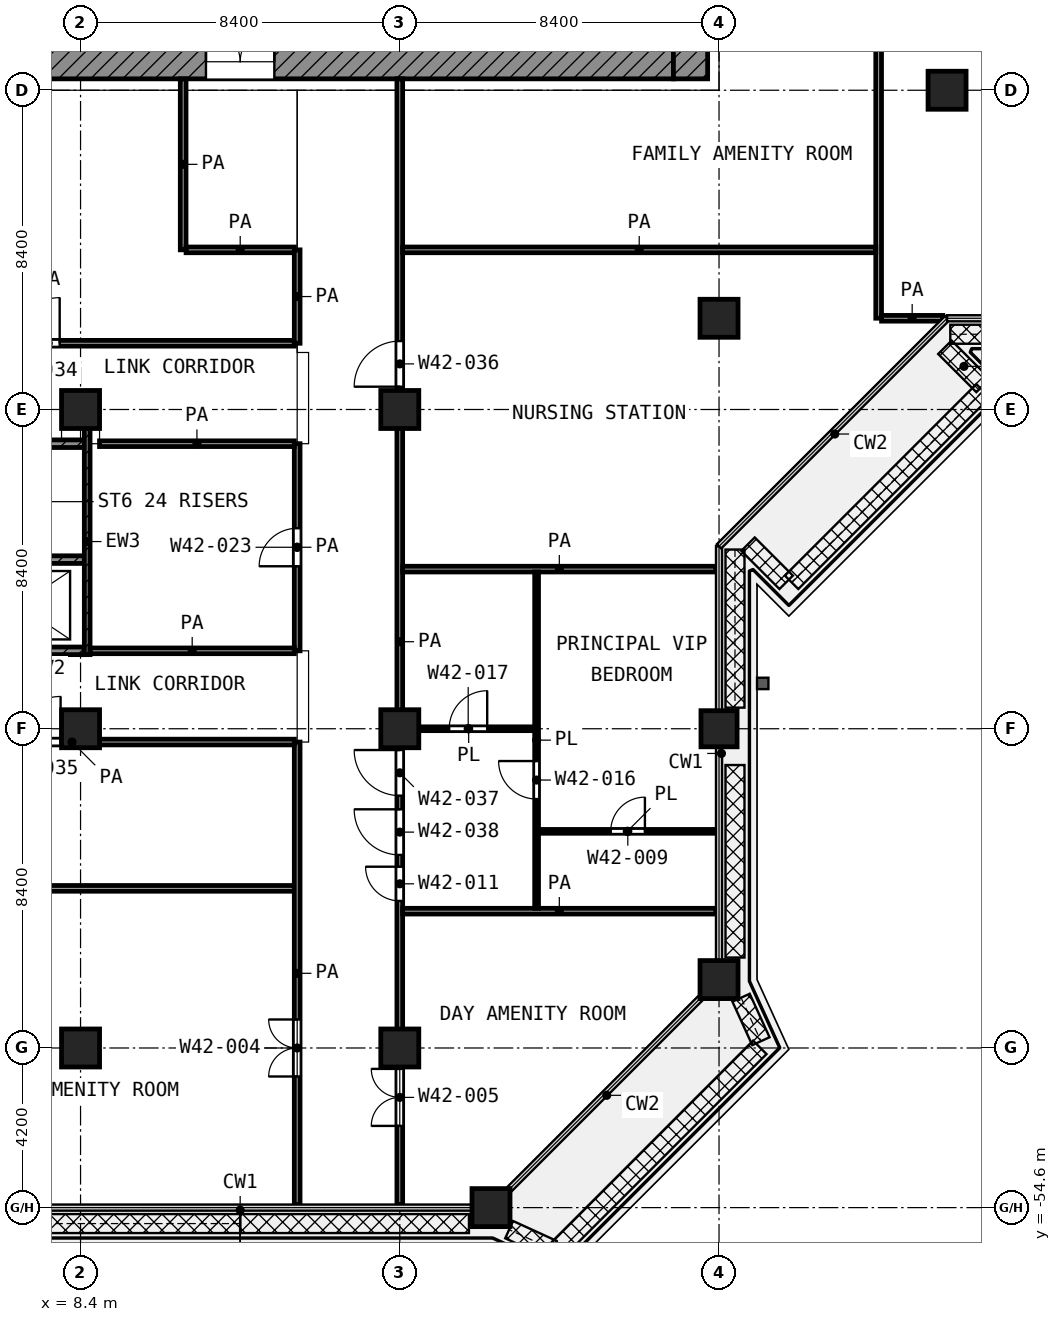
"""IFC4 building model, lengths in metres.
Left out: names, types, materials, properties, quantities, classifications, styles, units other than length and angle.
Written with IfcOpenShell. Run it as: python <this file> out.ifc"""

import sys

from ifc_helpers import new_model, si_unit, direction, frame, frame_2d, origin, origin_2d, place, context, subcontext, project, spatial, rectangle, extrude, element, fill, save


model = new_model("IFC4")
c1 = context("Model", 3, precision=1e-05, world=origin(), true_north=direction((0.0, 1.0)))
c2 = subcontext(c1, "Body", "Model", "MODEL_VIEW")
j1 = project(units=[si_unit("LENGTHUNIT", "METRE"), si_unit("PLANEANGLEUNIT", "RADIAN")], contexts=[c1])
p1 = place(None, origin())
s1 = spatial("IfcSite", under=j1, at=p1, CompositionType="ELEMENT")
p2 = place(p1, origin())
s2 = spatial("IfcBuilding", under=s1, at=p2, CompositionType="ELEMENT")
p3 = place(p2, frame((0.0, 0.0, 183.6)))
s3 = spatial("IfcBuildingStorey", under=s2, at=p3, CompositionType="ELEMENT", Elevation=183.6)
for number, where, z_axis, x_axis in (
    (1, (31.2, -25.2, 0.0), (0.0, 0.0, 1.0), (1.0, 0.0, 0.0)),
    (2, (25.2, -31.2, 0.0), (0.0, 0.0, 1.0), (1.0, 0.0, 0.0)),
    (3, (8.4, -33.6, 0.0), (0.0, 0.0, 1.0), (1.0, 0.0, 0.0)),
    (4, (16.8, -33.6, 0.0), (0.0, 0.0, 1.0), (1.0, 0.0, 0.0)),
    (5, (8.4, -42.0, 0.0), (0.0, 0.0, 1.0), (1.0, 0.0, 0.0)),
    (6, (16.8, -42.0, 0.0), (0.0, 0.0, 1.0), (1.0, 0.0, 0.0)),
):
    element("IfcColumn", number, at=place(p3, frame(where, z_axis=z_axis, x_axis=x_axis)), inside=s3, PredefinedType="COLUMN", context=c2, shape_type="SweptSolid", body=[
        extrude(rectangle(XDim=1.0, YDim=1.0, at=origin_2d()), origin(), (0.0, 0.0, 1.0), 4.2),
    ])
p4 = place(p3, frame((25.2, -42.0, 0.0), z_axis=(0.0, 0.0, 1.0), x_axis=(1.0, 0.0, 0.0)))
e7 = element("IfcColumn", 7, at=p4, inside=s3, PredefinedType="COLUMN", context=c2, shape_type="SweptSolid", body=[
    extrude(rectangle(XDim=0.95, YDim=0.95, at=origin_2d()), origin(), (0.0, 0.0, 1.0), 4.2),
])
for number, where, z_axis, x_axis in (
    (8, (25.2, -48.6, 0.0), (0.0, 0.0, 1.0), (1.0, 0.0, 0.0)),
    (9, (8.4, -50.4, 0.0), (0.0, 0.0, 1.0), (1.0, 0.0, 0.0)),
    (10, (16.8, -50.4, 0.0), (0.0, 0.0, 1.0), (1.0, 0.0, 0.0)),
    (11, (19.2, -54.6, 0.0), (0.0, 0.0, 1.0), (1.0, 0.0, 0.0)),
):
    element("IfcColumn", number, at=place(p3, frame(where, z_axis=z_axis, x_axis=x_axis)), inside=s3, PredefinedType="COLUMN", context=c2, shape_type="SweptSolid", body=[
        extrude(rectangle(XDim=1.0, YDim=1.0, at=origin_2d()), origin(), (0.0, 0.0, 1.0), 4.2),
    ])
p5 = place(p3, frame((5.4, -24.45, 0.0), z_axis=(0.0, 0.0, 1.0), x_axis=(1.0, 0.0, 0.0)))
e12 = element("IfcWall", 12, at=p5, inside=s3, PredefinedType="SHEAR", context=c2, shape_type="SweptSolid", body=[
    extrude(rectangle(XDim=18.6, YDim=0.9, at=frame_2d((9.3, 0.0))), origin(), (0.0, 0.0, 1.0), 3.6),
])
p6 = place(p5, frame((6.3, 0.0, 0.0)))
e13 = element("IfcOpeningElement", 13, at=p6, cuts=e12, PredefinedType="OPENING", context=c2, shape_type="SweptSolid", body=[
    extrude(rectangle(XDim=1.8, YDim=2.1, at=frame_2d((0.9, 1.05))), frame((0.0, 0.46, 0.0), z_axis=(0.0, -1.0, 0.0), x_axis=(1.0, 0.0, 0.0)), (0.0, 0.0, 1.0), 0.92),
])
p7 = place(p3, frame((24.45, -24.9, 0.0), z_axis=(0.0, 0.0, 1.0), x_axis=(0.0, 1.0, 0.0)))
e14 = element("IfcWall", 14, at=p7, inside=s3, PredefinedType="SHEAR", context=c2, shape_type="SweptSolid", body=[
    extrude(rectangle(XDim=0.9, YDim=0.9, at=frame_2d((0.45, 0.0))), origin(), (0.0, 0.0, 1.0), 3.6),
])
p8 = place(p3, frame((8.575, -40.05, 0.0), z_axis=(0.0, 0.0, 1.0), x_axis=(0.0, 1.0, 0.0)))
e15 = element("IfcWall", 15, at=p8, inside=s3, PredefinedType="SHEAR", context=c2, shape_type="SweptSolid", body=[
    extrude(rectangle(XDim=5.95, YDim=0.15, at=frame_2d((2.975, 0.0))), origin(), (0.0, 0.0, 1.0), 3.6),
])
p9 = place(p3, frame((0.45, -34.5, 0.0), z_axis=(0.0, 0.0, 1.0), x_axis=(1.0, 0.0, 0.0)))
e16 = element("IfcWall", 16, at=p9, inside=s3, PredefinedType="SHEAR", context=c2, shape_type="SweptSolid", body=[
    extrude(rectangle(XDim=8.05, YDim=0.2, at=frame_2d((4.025, 0.0))), origin(), (0.0, 0.0, 1.0), 3.6),
])
p10 = place(p9, frame((0.75, 0.0, 0.0)))
e17 = element("IfcOpeningElement", 17, at=p10, cuts=e16, PredefinedType="OPENING", context=c2, shape_type="SweptSolid", body=[
    extrude(rectangle(XDim=1.1, YDim=2.1, at=frame_2d((0.55, 1.05))), frame((0.0, 0.11, 0.0), z_axis=(0.0, -1.0, 0.0), x_axis=(1.0, 0.0, 0.0)), (0.0, 0.0, 1.0), 0.22),
])
p11 = place(p3, frame((0.45, -37.55, 0.0), z_axis=(0.0, 0.0, 1.0), x_axis=(1.0, 0.0, 0.0)))
e18 = element("IfcWall", 18, at=p11, inside=s3, PredefinedType="SHEAR", context=c2, shape_type="SweptSolid", body=[
    extrude(rectangle(XDim=8.05, YDim=0.2, at=frame_2d((4.025, 0.0))), origin(), (0.0, 0.0, 1.0), 3.6),
])
p12 = place(p11, frame((0.1, 0.0, 0.0)))
e19 = element("IfcOpeningElement", 19, at=p12, cuts=e18, PredefinedType="OPENING", context=c2, shape_type="SweptSolid", body=[
    extrude(rectangle(XDim=1.1, YDim=2.1, at=frame_2d((0.55, 1.05))), frame((0.0, 0.11, 0.0), z_axis=(0.0, -1.0, 0.0), x_axis=(1.0, 0.0, 0.0)), (0.0, 0.0, 1.0), 0.22),
])
p13 = place(p3, frame((0.45, -39.95, 0.0), z_axis=(0.0, 0.0, 1.0), x_axis=(1.0, 0.0, 0.0)))
e20 = element("IfcWall", 20, at=p13, inside=s3, PredefinedType="SHEAR", context=c2, shape_type="SweptSolid", body=[
    extrude(rectangle(XDim=8.05, YDim=0.2, at=frame_2d((4.025, 0.0))), origin(), (0.0, 0.0, 1.0), 3.6),
])
p14 = place(p13, frame((2.0, 0.0, 0.0)))
e21 = element("IfcOpeningElement", 21, at=p14, cuts=e20, PredefinedType="OPENING", context=c2, shape_type="SweptSolid", body=[
    extrude(rectangle(XDim=1.1, YDim=2.1, at=frame_2d((0.55, 1.05))), frame((0.0, 0.11, 0.0), z_axis=(0.0, -1.0, 0.0), x_axis=(1.0, 0.0, 0.0)), (0.0, 0.0, 1.0), 0.22),
])
p15 = place(p3, frame((20.45, -44.7, 0.0), z_axis=(0.0, 0.0, 1.0), x_axis=(1.0, 0.0, 0.0)))
e22 = element("IfcWall", 22, at=p15, inside=s3, PredefinedType="PARTITIONING", context=c2, shape_type="SweptSolid", body=[
    extrude(rectangle(XDim=4.67, YDim=0.1, at=frame_2d((2.335, 0.0))), origin(), (0.0, 0.0, 1.0), 3.6),
])
p16 = place(p15, frame((1.9, 0.0, 0.0)))
e23 = element("IfcOpeningElement", 23, at=p16, cuts=e22, PredefinedType="OPENING", context=c2, shape_type="SweptSolid", body=[
    extrude(rectangle(XDim=0.9, YDim=2.1, at=frame_2d((0.45, 1.05))), frame((0.0, 0.06, 0.0), z_axis=(0.0, -1.0, 0.0), x_axis=(1.0, 0.0, 0.0)), (0.0, 0.0, 1.0), 0.12),
])
p17 = place(p3, frame((16.875, -42.0, 0.0), z_axis=(0.0, 0.0, 1.0), x_axis=(1.0, 0.0, 0.0)))
e24 = element("IfcWall", 24, at=p17, inside=s3, PredefinedType="PARTITIONING", context=c2, shape_type="SweptSolid", body=[
    extrude(rectangle(XDim=3.475, YDim=0.1, at=frame_2d((1.738, 0.0))), origin(), (0.0, 0.0, 1.0), 3.6),
])
p18 = place(p17, frame((1.225, 0.0, 0.0)))
e25 = element("IfcOpeningElement", 25, at=p18, cuts=e24, PredefinedType="OPENING", context=c2, shape_type="SweptSolid", body=[
    extrude(rectangle(XDim=1.0, YDim=2.1, at=frame_2d((0.5, 1.05))), frame((0.0, 0.06, 0.0), z_axis=(0.0, -1.0, 0.0), x_axis=(1.0, 0.0, 0.0)), (0.0, 0.0, 1.0), 0.12),
])
p19 = place(p3, frame((20.4, -46.725, 0.0), z_axis=(0.0, 0.0, 1.0), x_axis=(0.0, 1.0, 0.0)))
e26 = element("IfcWall", 26, at=p19, inside=s3, PredefinedType="PARTITIONING", context=c2, shape_type="SweptSolid", body=[
    extrude(rectangle(XDim=8.85, YDim=0.1, at=frame_2d((4.425, 0.0))), origin(), (0.0, 0.0, 1.0), 3.6),
])
p20 = place(p19, frame((2.875, 0.0, 0.0)))
e27 = element("IfcOpeningElement", 27, at=p20, cuts=e26, PredefinedType="OPENING", context=c2, shape_type="SweptSolid", body=[
    extrude(rectangle(XDim=1.0, YDim=2.1, at=frame_2d((0.5, 1.05))), frame((0.0, 0.06, 0.0), z_axis=(0.0, -1.0, 0.0), x_axis=(1.0, 0.0, 0.0)), (0.0, 0.0, 1.0), 0.12),
])
p21 = place(p3, frame((16.875, -46.8, 0.0), z_axis=(0.0, 0.0, 1.0), x_axis=(1.0, 0.0, 0.0)))
e28 = element("IfcWall", 28, at=p21, inside=s3, PredefinedType="PARTITIONING", context=c2, shape_type="SweptSolid", body=[
    extrude(rectangle(XDim=8.245, YDim=0.15, at=frame_2d((4.123, 0.0))), origin(), (0.0, 0.0, 1.0), 3.6),
])
p22 = place(p3, frame((0.08, -46.2, 0.0), z_axis=(0.0, 0.0, 1.0), x_axis=(1.0, 0.0, 0.0)))
e29 = element("IfcWall", 29, at=p22, inside=s3, PredefinedType="PARTITIONING", context=c2, shape_type="SweptSolid", body=[
    extrude(rectangle(XDim=13.945, YDim=0.15, at=frame_2d((6.972, 0.0))), origin(), (0.0, 0.0, 1.0), 3.6),
])
p23 = place(p3, frame((2.326, -42.35, 0.0), z_axis=(0.0, 0.0, 1.0), x_axis=(1.0, 0.0, 0.0)))
e30 = element("IfcWall", 30, at=p23, inside=s3, PredefinedType="PARTITIONING", context=c2, shape_type="SweptSolid", body=[
    extrude(rectangle(XDim=11.699, YDim=0.15, at=frame_2d((5.85, 0.0))), origin(), (0.0, 0.0, 1.0), 3.6),
])
p24 = place(p23, frame((4.349, 0.0, 0.0)))
e31 = element("IfcOpeningElement", 31, at=p24, cuts=e30, PredefinedType="OPENING", context=c2, shape_type="SweptSolid", body=[
    extrude(rectangle(XDim=1.2, YDim=2.1, at=frame_2d((0.6, 1.05))), frame((0.0, 0.085, 0.0), z_axis=(0.0, -1.0, 0.0), x_axis=(1.0, 0.0, 0.0)), (0.0, 0.0, 1.0), 0.17),
])
p25 = place(p3, frame((8.65, -39.95, 0.0), z_axis=(0.0, 0.0, 1.0), x_axis=(1.0, 0.0, 0.0)))
e32 = element("IfcWall", 32, at=p25, inside=s3, PredefinedType="PARTITIONING", context=c2, shape_type="SweptSolid", body=[
    extrude(rectangle(XDim=5.375, YDim=0.15, at=frame_2d((2.688, 0.0))), origin(), (0.0, 0.0, 1.0), 3.6),
])
p26 = place(p3, frame((16.875, -37.8, 0.0), z_axis=(0.0, 0.0, 1.0), x_axis=(1.0, 0.0, 0.0)))
e33 = element("IfcWall", 33, at=p26, inside=s3, PredefinedType="PARTITIONING", context=c2, shape_type="SweptSolid", body=[
    extrude(rectangle(XDim=8.245, YDim=0.15, at=frame_2d((4.123, 0.0))), origin(), (0.0, 0.0, 1.0), 3.6),
])
p27 = place(p3, frame((8.9, -34.5, 0.0), z_axis=(0.0, 0.0, 1.0), x_axis=(1.0, 0.0, 0.0)))
e34 = element("IfcWall", 34, at=p27, inside=s3, PredefinedType="PARTITIONING", context=c2, shape_type="SweptSolid", body=[
    extrude(rectangle(XDim=5.125, YDim=0.15, at=frame_2d((2.562, 0.0))), origin(), (0.0, 0.0, 1.0), 3.6),
])
p28 = place(p3, frame((1.077, -31.857, 0.0), z_axis=(0.0, 0.0, 1.0), x_axis=(1.0, 0.0, 0.0)))
e35 = element("IfcWall", 35, at=p28, inside=s3, PredefinedType="PARTITIONING", context=c2, shape_type="SweptSolid", body=[
    extrude(rectangle(XDim=12.948, YDim=0.15, at=frame_2d((6.474, 0.0))), origin(), (0.0, 0.0, 1.0), 3.6),
])
p29 = place(p28, frame((5.574, 0.0, 0.0)))
e36 = element("IfcOpeningElement", 36, at=p29, cuts=e35, PredefinedType="OPENING", context=c2, shape_type="SweptSolid", body=[
    extrude(rectangle(XDim=1.2, YDim=2.1, at=frame_2d((0.6, 1.05))), frame((0.0, 0.085, 0.0), z_axis=(0.0, -1.0, 0.0), x_axis=(1.0, 0.0, 0.0)), (0.0, 0.0, 1.0), 0.17),
])
p30 = place(p3, frame((29.477, -31.2, 0.0), z_axis=(0.0, 0.0, 1.0), x_axis=(1.0, 0.0, 0.0)))
e37 = element("IfcWall", 37, at=p30, inside=s3, PredefinedType="PARTITIONING", context=c2, shape_type="SweptSolid", body=[
    extrude(rectangle(XDim=1.61, YDim=0.15, at=frame_2d((0.805, 0.0))), origin(), (0.0, 0.0, 1.0), 3.6),
])
p31 = place(p3, frame((11.177, -29.4, 0.0), z_axis=(0.0, 0.0, 1.0), x_axis=(1.0, 0.0, 0.0)))
e38 = element("IfcWall", 38, at=p31, inside=s3, PredefinedType="PARTITIONING", context=c2, shape_type="SweptSolid", body=[
    extrude(rectangle(XDim=2.848, YDim=0.15, at=frame_2d((1.424, 0.0))), origin(), (0.0, 0.0, 1.0), 3.6),
])
p32 = place(p3, frame((16.875, -29.4, 0.0), z_axis=(0.0, 0.0, 1.0), x_axis=(1.0, 0.0, 0.0)))
e39 = element("IfcWall", 39, at=p32, inside=s3, PredefinedType="PARTITIONING", context=c2, shape_type="SweptSolid", body=[
    extrude(rectangle(XDim=12.45, YDim=0.15, at=frame_2d((6.225, 0.0))), origin(), (0.0, 0.0, 1.0), 3.6),
])
p33 = place(p3, frame((11.1, -29.399, 0.0), z_axis=(0.0, 0.0, 1.0), x_axis=(0.0, 1.0, 0.0)))
e40 = element("IfcWall", 40, at=p33, inside=s3, PredefinedType="PARTITIONING", context=c2, shape_type="SweptSolid", body=[
    extrude(rectangle(XDim=4.499, YDim=0.15, at=frame_2d((2.25, 0.0))), origin(), (0.0, 0.0, 1.0), 3.6),
])
p34 = place(p3, frame((14.1, -54.52, 0.0), z_axis=(0.0, 0.0, 1.0), x_axis=(0.0, 1.0, 0.0)))
e41 = element("IfcWall", 41, at=p34, inside=s3, PredefinedType="PARTITIONING", context=c2, shape_type="SweptSolid", body=[
    extrude(rectangle(XDim=12.17, YDim=0.15, at=frame_2d((6.085, 0.0))), origin(), (0.0, 0.0, 1.0), 3.6),
])
p35 = place(p34, frame((3.37, 0.0, 0.0)))
e42 = element("IfcOpeningElement", 42, at=p35, cuts=e41, PredefinedType="OPENING", context=c2, shape_type="SweptSolid", body=[
    extrude(rectangle(XDim=1.5, YDim=2.1, at=frame_2d((0.75, 1.05))), frame((0.0, 0.085, 0.0), z_axis=(0.0, -1.0, 0.0), x_axis=(1.0, 0.0, 0.0)), (0.0, 0.0, 1.0), 0.17),
])
p36 = place(p3, frame((14.1, -39.95, 0.0), z_axis=(0.0, 0.0, 1.0), x_axis=(0.0, 1.0, 0.0)))
e43 = element("IfcWall", 43, at=p36, inside=s3, PredefinedType="PARTITIONING", context=c2, shape_type="SweptSolid", body=[
    extrude(rectangle(XDim=5.45, YDim=0.15, at=frame_2d((2.725, 0.0))), origin(), (0.0, 0.0, 1.0), 3.6),
])
p37 = place(p36, frame((2.225, 0.0, 0.0)))
e44 = element("IfcOpeningElement", 44, at=p37, cuts=e43, PredefinedType="OPENING", context=c2, shape_type="SweptSolid", body=[
    extrude(rectangle(XDim=1.0, YDim=2.1, at=frame_2d((0.5, 1.05))), frame((0.0, 0.085, 0.0), z_axis=(0.0, -1.0, 0.0), x_axis=(1.0, 0.0, 0.0)), (0.0, 0.0, 1.0), 0.17),
])
p38 = place(p3, frame((14.1, -31.857, 0.0), z_axis=(0.0, 0.0, 1.0), x_axis=(0.0, 1.0, 0.0)))
e45 = element("IfcWall", 45, at=p38, inside=s3, PredefinedType="PARTITIONING", context=c2, shape_type="SweptSolid", body=[
    extrude(rectangle(XDim=2.457, YDim=0.15, at=frame_2d((1.229, 0.0))), origin(), (0.0, 0.0, 1.0), 3.6),
])
p39 = place(p3, frame((16.8, -54.52, 0.0), z_axis=(0.0, 0.0, 1.0), x_axis=(0.0, 1.0, 0.0)))
e46 = element("IfcWall", 46, at=p39, inside=s3, PredefinedType="PARTITIONING", context=c2, shape_type="SweptSolid", body=[
    extrude(rectangle(XDim=29.62, YDim=0.15, at=frame_2d((14.81, 0.0))), origin(), (0.0, 0.0, 1.0), 3.6),
])
p40 = place(p39, frame((21.52, 0.0, 0.0)))
e47 = element("IfcOpeningElement", 47, at=p40, cuts=e46, PredefinedType="OPENING", context=c2, shape_type="SweptSolid", body=[
    extrude(rectangle(XDim=1.2, YDim=2.1, at=frame_2d((0.6, 1.05))), frame((0.0, 0.085, 0.0), z_axis=(0.0, -1.0, 0.0), x_axis=(1.0, 0.0, 0.0)), (0.0, 0.0, 1.0), 0.17),
])
p41 = place(p39, frame((10.76, 0.0, 0.0)))
e48 = element("IfcOpeningElement", 48, at=p41, cuts=e46, PredefinedType="OPENING", context=c2, shape_type="SweptSolid", body=[
    extrude(rectangle(XDim=1.2, YDim=2.1, at=frame_2d((0.6, 1.05))), frame((0.0, 0.085, 0.0), z_axis=(0.0, -1.0, 0.0), x_axis=(1.0, 0.0, 0.0)), (0.0, 0.0, 1.0), 0.17),
])
p42 = place(p39, frame((9.2, 0.0, 0.0)))
e49 = element("IfcOpeningElement", 49, at=p42, cuts=e46, PredefinedType="OPENING", context=c2, shape_type="SweptSolid", body=[
    extrude(rectangle(XDim=1.2, YDim=2.1, at=frame_2d((0.6, 1.05))), frame((0.0, 0.085, 0.0), z_axis=(0.0, -1.0, 0.0), x_axis=(1.0, 0.0, 0.0)), (0.0, 0.0, 1.0), 0.17),
])
p43 = place(p39, frame((7.99, 0.0, 0.0)))
e50 = element("IfcOpeningElement", 50, at=p43, cuts=e46, PredefinedType="OPENING", context=c2, shape_type="SweptSolid", body=[
    extrude(rectangle(XDim=0.9, YDim=2.1, at=frame_2d((0.45, 1.05))), frame((0.0, 0.085, 0.0), z_axis=(0.0, -1.0, 0.0), x_axis=(1.0, 0.0, 0.0)), (0.0, 0.0, 1.0), 0.17),
])
p44 = place(p39, frame((2.07, 0.0, 0.0)))
e51 = element("IfcOpeningElement", 51, at=p44, cuts=e46, PredefinedType="OPENING", context=c2, shape_type="SweptSolid", body=[
    extrude(rectangle(XDim=1.5, YDim=2.1, at=frame_2d((0.75, 1.05))), frame((0.0, 0.085, 0.0), z_axis=(0.0, -1.0, 0.0), x_axis=(1.0, 0.0, 0.0)), (0.0, 0.0, 1.0), 0.17),
])
p45 = place(p3, frame((29.4, -31.198, 0.0), z_axis=(0.0, 0.0, 1.0), x_axis=(0.0, 1.0, 0.0)))
e52 = element("IfcWall", 52, at=p45, inside=s3, PredefinedType="PARTITIONING", context=c2, shape_type="SweptSolid", body=[
    extrude(rectangle(XDim=14.323, YDim=0.15, at=frame_2d((7.162, 0.0))), origin(), (0.0, 0.0, 1.0), 3.6),
])
p46 = place(p6, origin())
e53 = element("IfcDoor", 53, at=p46, inside=s3, OperationType="DOUBLE_DOOR_SINGLE_SWING", PredefinedType="DOOR", context=c2, shape_type="SweptSolid", body=[
    extrude(rectangle(XDim=1.8, YDim=2.1, at=frame_2d((0.9, 1.05))), frame((0.0, 0.025, 0.0), z_axis=(0.0, -1.0, 0.0), x_axis=(1.0, 0.0, 0.0)), (0.0, 0.0, 1.0), 0.05),
])
fill(e13, e53)
p47 = place(p29, origin())
e54 = element("IfcDoor", 54, at=p47, inside=s3, OperationType="SINGLE_SWING_RIGHT", PredefinedType="DOOR", context=c2, shape_type="SweptSolid", body=[
    extrude(rectangle(XDim=1.2, YDim=2.1, at=frame_2d((0.6, 1.05))), frame((0.0, 0.025, 0.0), z_axis=(0.0, -1.0, 0.0), x_axis=(1.0, 0.0, 0.0)), (0.0, 0.0, 1.0), 0.05),
])
fill(e36, e54)
p48 = place(p37, origin())
e55 = element("IfcDoor", 55, at=p48, inside=s3, OperationType="SINGLE_SWING_LEFT", PredefinedType="DOOR", context=c2, shape_type="SweptSolid", body=[
    extrude(rectangle(XDim=1.0, YDim=2.1, at=frame_2d((0.5, 1.05))), frame((0.0, 0.025, 0.0), z_axis=(0.0, -1.0, 0.0), x_axis=(1.0, 0.0, 0.0)), (0.0, 0.0, 1.0), 0.05),
])
fill(e44, e55)
p49 = place(p24, origin())
e56 = element("IfcDoor", 56, at=p49, inside=s3, OperationType="SINGLE_SWING_RIGHT", PredefinedType="DOOR", context=c2, shape_type="SweptSolid", body=[
    extrude(rectangle(XDim=1.2, YDim=2.1, at=frame_2d((0.6, 1.05))), frame((0.0, 0.025, 0.0), z_axis=(0.0, -1.0, 0.0), x_axis=(1.0, 0.0, 0.0)), (0.0, 0.0, 1.0), 0.05),
])
fill(e31, e56)
p50 = place(p35, origin())
e57 = element("IfcDoor", 57, at=p50, inside=s3, OperationType="DOUBLE_DOOR_SINGLE_SWING", PredefinedType="DOOR", context=c2, shape_type="SweptSolid", body=[
    extrude(rectangle(XDim=1.5, YDim=2.1, at=frame_2d((0.75, 1.05))), frame((0.0, 0.025, 0.0), z_axis=(0.0, -1.0, 0.0), x_axis=(1.0, 0.0, 0.0)), (0.0, 0.0, 1.0), 0.05),
])
fill(e42, e57)
p51 = place(p40, origin())
e58 = element("IfcDoor", 58, at=p51, inside=s3, OperationType="SINGLE_SWING_LEFT", PredefinedType="DOOR", context=c2, shape_type="SweptSolid", body=[
    extrude(rectangle(XDim=1.2, YDim=2.1, at=frame_2d((0.6, 1.05))), frame((0.0, 0.025, 0.0), z_axis=(0.0, -1.0, 0.0), x_axis=(1.0, 0.0, 0.0)), (0.0, 0.0, 1.0), 0.05),
])
fill(e47, e58)
p52 = place(p41, origin())
e59 = element("IfcDoor", 59, at=p52, inside=s3, OperationType="SINGLE_SWING_RIGHT", PredefinedType="DOOR", context=c2, shape_type="SweptSolid", body=[
    extrude(rectangle(XDim=1.2, YDim=2.1, at=frame_2d((0.6, 1.05))), frame((0.0, 0.025, 0.0), z_axis=(0.0, -1.0, 0.0), x_axis=(1.0, 0.0, 0.0)), (0.0, 0.0, 1.0), 0.05),
])
fill(e48, e59)
p53 = place(p42, origin())
e60 = element("IfcDoor", 60, at=p53, inside=s3, OperationType="SINGLE_SWING_RIGHT", PredefinedType="DOOR", context=c2, shape_type="SweptSolid", body=[
    extrude(rectangle(XDim=1.2, YDim=2.1, at=frame_2d((0.6, 1.05))), frame((0.0, 0.025, 0.0), z_axis=(0.0, -1.0, 0.0), x_axis=(1.0, 0.0, 0.0)), (0.0, 0.0, 1.0), 0.05),
])
fill(e49, e60)
p54 = place(p43, origin())
e61 = element("IfcDoor", 61, at=p54, inside=s3, OperationType="SINGLE_SWING_RIGHT", PredefinedType="DOOR", context=c2, shape_type="SweptSolid", body=[
    extrude(rectangle(XDim=0.9, YDim=2.1, at=frame_2d((0.45, 1.05))), frame((0.0, 0.025, 0.0), z_axis=(0.0, -1.0, 0.0), x_axis=(1.0, 0.0, 0.0)), (0.0, 0.0, 1.0), 0.05),
])
fill(e50, e61)
p55 = place(p20, origin())
e62 = element("IfcDoor", 62, at=p55, inside=s3, OperationType="SINGLE_SWING_RIGHT", PredefinedType="DOOR", context=c2, shape_type="SweptSolid", body=[
    extrude(rectangle(XDim=1.0, YDim=2.1, at=frame_2d((0.5, 1.05))), frame((0.0, 0.025, 0.0), z_axis=(0.0, -1.0, 0.0), x_axis=(1.0, 0.0, 0.0)), (0.0, 0.0, 1.0), 0.05),
])
fill(e27, e62)
p56 = place(p18, origin())
e63 = element("IfcDoor", 63, at=p56, inside=s3, OperationType="SINGLE_SWING_RIGHT", PredefinedType="DOOR", context=c2, shape_type="SweptSolid", body=[
    extrude(rectangle(XDim=1.0, YDim=2.1, at=frame_2d((0.5, 1.05))), frame((0.0, 0.025, 0.0), z_axis=(0.0, -1.0, 0.0), x_axis=(1.0, 0.0, 0.0)), (0.0, 0.0, 1.0), 0.05),
])
fill(e25, e63)
p57 = place(p16, origin())
e64 = element("IfcDoor", 64, at=p57, inside=s3, OperationType="SINGLE_SWING_RIGHT", PredefinedType="DOOR", context=c2, shape_type="SweptSolid", body=[
    extrude(rectangle(XDim=0.9, YDim=2.1, at=frame_2d((0.45, 1.05))), frame((0.0, 0.025, 0.0), z_axis=(0.0, -1.0, 0.0), x_axis=(1.0, 0.0, 0.0)), (0.0, 0.0, 1.0), 0.05),
])
fill(e23, e64)
p58 = place(p44, origin())
e65 = element("IfcDoor", 65, at=p58, inside=s3, OperationType="DOUBLE_DOOR_SINGLE_SWING", PredefinedType="DOOR", context=c2, shape_type="SweptSolid", body=[
    extrude(rectangle(XDim=1.5, YDim=2.1, at=frame_2d((0.75, 1.05))), frame((0.0, 0.025, 0.0), z_axis=(0.0, -1.0, 0.0), x_axis=(1.0, 0.0, 0.0)), (0.0, 0.0, 1.0), 0.05),
])
fill(e51, e65)
save(model, sys.argv[1])
